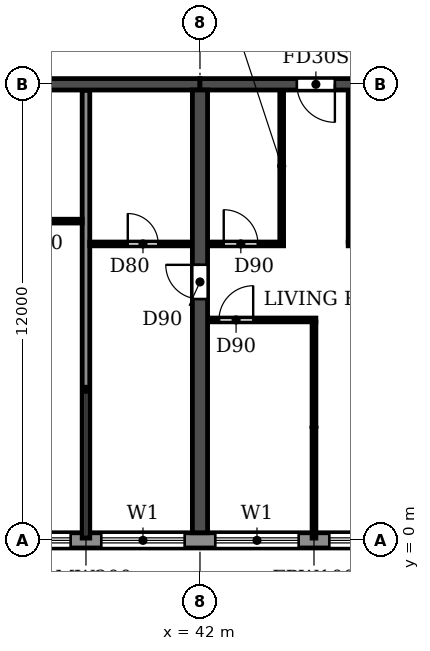
"""IFC4 building model, lengths in metres.
Left out: names, types, materials, properties, quantities, classifications, styles, units other than length and angle.
Written with IfcOpenShell. Run it as: python <this file> out.ifc"""

import sys

from ifc_helpers import new_model, si_unit, direction, frame, frame_2d, origin, place, context, subcontext, project, spatial, rectangle, extrude, element, fill, save


model = new_model("IFC4")
c1 = context("Model", 3, precision=1e-05, world=origin(), true_north=direction((0.0, 1.0)))
c2 = subcontext(c1, "Body", "Model", "MODEL_VIEW")
j1 = project(units=[si_unit("LENGTHUNIT", "METRE"), si_unit("PLANEANGLEUNIT", "RADIAN")], contexts=[c1])
p1 = place(None, origin())
s1 = spatial("IfcSite", under=j1, at=p1, CompositionType="ELEMENT")
p2 = place(p1, origin())
s2 = spatial("IfcBuilding", under=s1, at=p2, CompositionType="ELEMENT")
p3 = place(p2, frame((0.0, 0.0, 33.3)))
s3 = spatial("IfcBuildingStorey", under=s2, at=p3, CompositionType="ELEMENT", Elevation=33.3)
p4 = place(p3, frame((42.0, 0.2, 0.0), z_axis=(0.0, 0.0, 1.0), x_axis=(0.0, 1.0, 0.0)))
e1 = element("IfcWall", 1, at=p4, inside=s3, PredefinedType="SHEAR", context=c2, shape_type="SweptSolid", body=[
    extrude(rectangle(XDim=11.65, YDim=0.4, at=frame_2d((5.825, 0.0))), origin(), (0.0, 0.0, 1.0), 3.05),
])
p5 = place(p4, frame((6.15, 0.0, 0.0)))
e2 = element("IfcOpeningElement", 2, at=p5, cuts=e1, PredefinedType="OPENING", context=c2, shape_type="SweptSolid", body=[
    extrude(rectangle(XDim=0.9, YDim=2.1, at=frame_2d((0.45, 1.05))), frame((0.0, 0.21, 0.0), z_axis=(0.0, -1.0, 0.0), x_axis=(1.0, 0.0, 0.0)), (0.0, 0.0, 1.0), 0.42),
])
p6 = place(p3, frame((36.0, 12.0, 0.0), z_axis=(0.0, 0.0, 1.0), x_axis=(1.0, 0.0, 0.0)))
e3 = element("IfcWall", 3, at=p6, inside=s3, PredefinedType="SHEAR", context=c2, shape_type="SweptSolid", body=[
    extrude(rectangle(XDim=6.0, YDim=0.3, at=frame_2d((3.0, 0.0))), origin(), (0.0, 0.0, 1.0), 2.45),
])
p7 = place(p3, frame((42.0, 12.0, 0.0), z_axis=(0.0, 0.0, 1.0), x_axis=(1.0, 0.0, 0.0)))
e4 = element("IfcWall", 4, at=p7, inside=s3, PredefinedType="SHEAR", context=c2, shape_type="SweptSolid", body=[
    extrude(rectangle(XDim=6.0, YDim=0.3, at=frame_2d((3.0, 0.0))), origin(), (0.0, 0.0, 1.0), 2.45),
])
p8 = place(p7, frame((2.55, 0.0, 0.0)))
e5 = element("IfcOpeningElement", 5, at=p8, cuts=e4, PredefinedType="OPENING", context=c2, shape_type="SweptSolid", body=[
    extrude(rectangle(XDim=1.0, YDim=2.1, at=frame_2d((0.5, 1.05))), frame((0.0, 0.16, 0.0), z_axis=(0.0, -1.0, 0.0), x_axis=(1.0, 0.0, 0.0)), (0.0, 0.0, 1.0), 0.32),
])
p9 = place(p3, frame((4.683, 0.0, 0.0), z_axis=(0.0, 0.0, 1.0), x_axis=(1.0, 0.0, 0.0)))
e6 = element("IfcWall", 6, at=p9, inside=s3, PredefinedType="STANDARD", context=c2, shape_type="SweptSolid", body=[
    extrude(rectangle(XDim=92.634, YDim=0.4, at=frame_2d((46.317, 0.0))), origin(), (0.0, 0.0, 1.0), 3.05),
])
p10 = place(p9, frame((1.717, 0.0, 0.9)))
e7 = element("IfcOpeningElement", 7, at=p10, cuts=e6, PredefinedType="OPENING", context=c2, shape_type="SweptSolid", body=[
    extrude(rectangle(XDim=2.2, YDim=1.5, at=frame_2d((1.1, 0.75))), frame((0.0, 0.21, 0.0), z_axis=(0.0, -1.0, 0.0), x_axis=(1.0, 0.0, 0.0)), (0.0, 0.0, 1.0), 0.42),
])
p11 = place(p9, frame((4.717, 0.0, 0.9)))
e8 = element("IfcOpeningElement", 8, at=p11, cuts=e6, PredefinedType="OPENING", context=c2, shape_type="SweptSolid", body=[
    extrude(rectangle(XDim=2.2, YDim=1.5, at=frame_2d((1.1, 0.75))), frame((0.0, 0.21, 0.0), z_axis=(0.0, -1.0, 0.0), x_axis=(1.0, 0.0, 0.0)), (0.0, 0.0, 1.0), 0.42),
])
p12 = place(p9, frame((7.917, 0.0, 0.0)))
e9 = element("IfcOpeningElement", 9, at=p12, cuts=e6, PredefinedType="OPENING", context=c2, shape_type="SweptSolid", body=[
    extrude(rectangle(XDim=1.8, YDim=2.4, at=frame_2d((0.9, 1.2))), frame((0.0, 0.21, 0.0), z_axis=(0.0, -1.0, 0.0), x_axis=(1.0, 0.0, 0.0)), (0.0, 0.0, 1.0), 0.42),
])
p13 = place(p9, frame((10.717, 0.0, 0.9)))
e10 = element("IfcOpeningElement", 10, at=p13, cuts=e6, PredefinedType="OPENING", context=c2, shape_type="SweptSolid", body=[
    extrude(rectangle(XDim=2.2, YDim=1.5, at=frame_2d((1.1, 0.75))), frame((0.0, 0.21, 0.0), z_axis=(0.0, -1.0, 0.0), x_axis=(1.0, 0.0, 0.0)), (0.0, 0.0, 1.0), 0.42),
])
p14 = place(p9, frame((13.717, 0.0, 0.9)))
e11 = element("IfcOpeningElement", 11, at=p14, cuts=e6, PredefinedType="OPENING", context=c2, shape_type="SweptSolid", body=[
    extrude(rectangle(XDim=2.2, YDim=1.5, at=frame_2d((1.1, 0.75))), frame((0.0, 0.21, 0.0), z_axis=(0.0, -1.0, 0.0), x_axis=(1.0, 0.0, 0.0)), (0.0, 0.0, 1.0), 0.42),
])
p15 = place(p9, frame((16.717, 0.0, 0.9)))
e12 = element("IfcOpeningElement", 12, at=p15, cuts=e6, PredefinedType="OPENING", context=c2, shape_type="SweptSolid", body=[
    extrude(rectangle(XDim=2.2, YDim=1.5, at=frame_2d((1.1, 0.75))), frame((0.0, 0.21, 0.0), z_axis=(0.0, -1.0, 0.0), x_axis=(1.0, 0.0, 0.0)), (0.0, 0.0, 1.0), 0.42),
])
p16 = place(p9, frame((19.717, 0.0, 0.9)))
e13 = element("IfcOpeningElement", 13, at=p16, cuts=e6, PredefinedType="OPENING", context=c2, shape_type="SweptSolid", body=[
    extrude(rectangle(XDim=2.2, YDim=1.5, at=frame_2d((1.1, 0.75))), frame((0.0, 0.21, 0.0), z_axis=(0.0, -1.0, 0.0), x_axis=(1.0, 0.0, 0.0)), (0.0, 0.0, 1.0), 0.42),
])
p17 = place(p9, frame((22.917, 0.0, 0.0)))
e14 = element("IfcOpeningElement", 14, at=p17, cuts=e6, PredefinedType="OPENING", context=c2, shape_type="SweptSolid", body=[
    extrude(rectangle(XDim=1.8, YDim=2.4, at=frame_2d((0.9, 1.2))), frame((0.0, 0.21, 0.0), z_axis=(0.0, -1.0, 0.0), x_axis=(1.0, 0.0, 0.0)), (0.0, 0.0, 1.0), 0.42),
])
p18 = place(p9, frame((25.717, 0.0, 0.9)))
e15 = element("IfcOpeningElement", 15, at=p18, cuts=e6, PredefinedType="OPENING", context=c2, shape_type="SweptSolid", body=[
    extrude(rectangle(XDim=2.2, YDim=1.5, at=frame_2d((1.1, 0.75))), frame((0.0, 0.21, 0.0), z_axis=(0.0, -1.0, 0.0), x_axis=(1.0, 0.0, 0.0)), (0.0, 0.0, 1.0), 0.42),
])
p19 = place(p9, frame((28.717, 0.0, 0.9)))
e16 = element("IfcOpeningElement", 16, at=p19, cuts=e6, PredefinedType="OPENING", context=c2, shape_type="SweptSolid", body=[
    extrude(rectangle(XDim=2.2, YDim=1.5, at=frame_2d((1.1, 0.75))), frame((0.0, 0.21, 0.0), z_axis=(0.0, -1.0, 0.0), x_axis=(1.0, 0.0, 0.0)), (0.0, 0.0, 1.0), 0.42),
])
p20 = place(p9, frame((31.717, 0.0, 0.9)))
e17 = element("IfcOpeningElement", 17, at=p20, cuts=e6, PredefinedType="OPENING", context=c2, shape_type="SweptSolid", body=[
    extrude(rectangle(XDim=2.2, YDim=1.5, at=frame_2d((1.1, 0.75))), frame((0.0, 0.21, 0.0), z_axis=(0.0, -1.0, 0.0), x_axis=(1.0, 0.0, 0.0)), (0.0, 0.0, 1.0), 0.42),
])
p21 = place(p9, frame((34.717, 0.0, 0.9)))
e18 = element("IfcOpeningElement", 18, at=p21, cuts=e6, PredefinedType="OPENING", context=c2, shape_type="SweptSolid", body=[
    extrude(rectangle(XDim=2.2, YDim=1.5, at=frame_2d((1.1, 0.75))), frame((0.0, 0.21, 0.0), z_axis=(0.0, -1.0, 0.0), x_axis=(1.0, 0.0, 0.0)), (0.0, 0.0, 1.0), 0.42),
])
p22 = place(p9, frame((37.717, 0.0, 0.9)))
e19 = element("IfcOpeningElement", 19, at=p22, cuts=e6, PredefinedType="OPENING", context=c2, shape_type="SweptSolid", body=[
    extrude(rectangle(XDim=2.2, YDim=1.5, at=frame_2d((1.1, 0.75))), frame((0.0, 0.21, 0.0), z_axis=(0.0, -1.0, 0.0), x_axis=(1.0, 0.0, 0.0)), (0.0, 0.0, 1.0), 0.42),
])
p23 = place(p9, frame((40.717, 0.0, 0.9)))
e20 = element("IfcOpeningElement", 20, at=p23, cuts=e6, PredefinedType="OPENING", context=c2, shape_type="SweptSolid", body=[
    extrude(rectangle(XDim=2.2, YDim=1.5, at=frame_2d((1.1, 0.75))), frame((0.0, 0.21, 0.0), z_axis=(0.0, -1.0, 0.0), x_axis=(1.0, 0.0, 0.0)), (0.0, 0.0, 1.0), 0.42),
])
p24 = place(p9, frame((43.717, 0.0, 0.9)))
e21 = element("IfcOpeningElement", 21, at=p24, cuts=e6, PredefinedType="OPENING", context=c2, shape_type="SweptSolid", body=[
    extrude(rectangle(XDim=2.2, YDim=1.5, at=frame_2d((1.1, 0.75))), frame((0.0, 0.21, 0.0), z_axis=(0.0, -1.0, 0.0), x_axis=(1.0, 0.0, 0.0)), (0.0, 0.0, 1.0), 0.42),
])
p25 = place(p9, frame((46.917, 0.0, 0.0)))
e22 = element("IfcOpeningElement", 22, at=p25, cuts=e6, PredefinedType="OPENING", context=c2, shape_type="SweptSolid", body=[
    extrude(rectangle(XDim=1.8, YDim=2.4, at=frame_2d((0.9, 1.2))), frame((0.0, 0.21, 0.0), z_axis=(0.0, -1.0, 0.0), x_axis=(1.0, 0.0, 0.0)), (0.0, 0.0, 1.0), 0.42),
])
p26 = place(p9, frame((49.717, 0.0, 0.9)))
e23 = element("IfcOpeningElement", 23, at=p26, cuts=e6, PredefinedType="OPENING", context=c2, shape_type="SweptSolid", body=[
    extrude(rectangle(XDim=2.2, YDim=1.5, at=frame_2d((1.1, 0.75))), frame((0.0, 0.21, 0.0), z_axis=(0.0, -1.0, 0.0), x_axis=(1.0, 0.0, 0.0)), (0.0, 0.0, 1.0), 0.42),
])
p27 = place(p9, frame((52.717, 0.0, 0.9)))
e24 = element("IfcOpeningElement", 24, at=p27, cuts=e6, PredefinedType="OPENING", context=c2, shape_type="SweptSolid", body=[
    extrude(rectangle(XDim=2.2, YDim=1.5, at=frame_2d((1.1, 0.75))), frame((0.0, 0.21, 0.0), z_axis=(0.0, -1.0, 0.0), x_axis=(1.0, 0.0, 0.0)), (0.0, 0.0, 1.0), 0.42),
])
p28 = place(p9, frame((55.717, 0.0, 0.9)))
e25 = element("IfcOpeningElement", 25, at=p28, cuts=e6, PredefinedType="OPENING", context=c2, shape_type="SweptSolid", body=[
    extrude(rectangle(XDim=2.2, YDim=1.5, at=frame_2d((1.1, 0.75))), frame((0.0, 0.21, 0.0), z_axis=(0.0, -1.0, 0.0), x_axis=(1.0, 0.0, 0.0)), (0.0, 0.0, 1.0), 0.42),
])
p29 = place(p9, frame((58.917, 0.0, 0.0)))
e26 = element("IfcOpeningElement", 26, at=p29, cuts=e6, PredefinedType="OPENING", context=c2, shape_type="SweptSolid", body=[
    extrude(rectangle(XDim=1.8, YDim=2.4, at=frame_2d((0.9, 1.2))), frame((0.0, 0.21, 0.0), z_axis=(0.0, -1.0, 0.0), x_axis=(1.0, 0.0, 0.0)), (0.0, 0.0, 1.0), 0.42),
])
p30 = place(p9, frame((61.717, 0.0, 0.9)))
e27 = element("IfcOpeningElement", 27, at=p30, cuts=e6, PredefinedType="OPENING", context=c2, shape_type="SweptSolid", body=[
    extrude(rectangle(XDim=2.2, YDim=1.5, at=frame_2d((1.1, 0.75))), frame((0.0, 0.21, 0.0), z_axis=(0.0, -1.0, 0.0), x_axis=(1.0, 0.0, 0.0)), (0.0, 0.0, 1.0), 0.42),
])
p31 = place(p9, frame((64.717, 0.0, 0.9)))
e28 = element("IfcOpeningElement", 28, at=p31, cuts=e6, PredefinedType="OPENING", context=c2, shape_type="SweptSolid", body=[
    extrude(rectangle(XDim=2.2, YDim=1.5, at=frame_2d((1.1, 0.75))), frame((0.0, 0.21, 0.0), z_axis=(0.0, -1.0, 0.0), x_axis=(1.0, 0.0, 0.0)), (0.0, 0.0, 1.0), 0.42),
])
p32 = place(p9, frame((67.717, 0.0, 0.9)))
e29 = element("IfcOpeningElement", 29, at=p32, cuts=e6, PredefinedType="OPENING", context=c2, shape_type="SweptSolid", body=[
    extrude(rectangle(XDim=2.2, YDim=1.5, at=frame_2d((1.1, 0.75))), frame((0.0, 0.21, 0.0), z_axis=(0.0, -1.0, 0.0), x_axis=(1.0, 0.0, 0.0)), (0.0, 0.0, 1.0), 0.42),
])
p33 = place(p9, frame((70.917, 0.0, 0.0)))
e30 = element("IfcOpeningElement", 30, at=p33, cuts=e6, PredefinedType="OPENING", context=c2, shape_type="SweptSolid", body=[
    extrude(rectangle(XDim=1.8, YDim=2.4, at=frame_2d((0.9, 1.2))), frame((0.0, 0.21, 0.0), z_axis=(0.0, -1.0, 0.0), x_axis=(1.0, 0.0, 0.0)), (0.0, 0.0, 1.0), 0.42),
])
p34 = place(p9, frame((73.717, 0.0, 0.9)))
e31 = element("IfcOpeningElement", 31, at=p34, cuts=e6, PredefinedType="OPENING", context=c2, shape_type="SweptSolid", body=[
    extrude(rectangle(XDim=2.2, YDim=1.5, at=frame_2d((1.1, 0.75))), frame((0.0, 0.21, 0.0), z_axis=(0.0, -1.0, 0.0), x_axis=(1.0, 0.0, 0.0)), (0.0, 0.0, 1.0), 0.42),
])
p35 = place(p9, frame((76.717, 0.0, 0.9)))
e32 = element("IfcOpeningElement", 32, at=p35, cuts=e6, PredefinedType="OPENING", context=c2, shape_type="SweptSolid", body=[
    extrude(rectangle(XDim=2.2, YDim=1.5, at=frame_2d((1.1, 0.75))), frame((0.0, 0.21, 0.0), z_axis=(0.0, -1.0, 0.0), x_axis=(1.0, 0.0, 0.0)), (0.0, 0.0, 1.0), 0.42),
])
p36 = place(p9, frame((79.717, 0.0, 0.9)))
e33 = element("IfcOpeningElement", 33, at=p36, cuts=e6, PredefinedType="OPENING", context=c2, shape_type="SweptSolid", body=[
    extrude(rectangle(XDim=2.2, YDim=1.5, at=frame_2d((1.1, 0.75))), frame((0.0, 0.21, 0.0), z_axis=(0.0, -1.0, 0.0), x_axis=(1.0, 0.0, 0.0)), (0.0, 0.0, 1.0), 0.42),
])
p37 = place(p9, frame((82.717, 0.0, 0.9)))
e34 = element("IfcOpeningElement", 34, at=p37, cuts=e6, PredefinedType="OPENING", context=c2, shape_type="SweptSolid", body=[
    extrude(rectangle(XDim=2.2, YDim=1.5, at=frame_2d((1.1, 0.75))), frame((0.0, 0.21, 0.0), z_axis=(0.0, -1.0, 0.0), x_axis=(1.0, 0.0, 0.0)), (0.0, 0.0, 1.0), 0.42),
])
p38 = place(p9, frame((85.717, 0.0, 0.9)))
e35 = element("IfcOpeningElement", 35, at=p38, cuts=e6, PredefinedType="OPENING", context=c2, shape_type="SweptSolid", body=[
    extrude(rectangle(XDim=2.2, YDim=1.5, at=frame_2d((1.1, 0.75))), frame((0.0, 0.21, 0.0), z_axis=(0.0, -1.0, 0.0), x_axis=(1.0, 0.0, 0.0)), (0.0, 0.0, 1.0), 0.42),
])
p39 = place(p9, frame((88.717, 0.0, 0.9)))
e36 = element("IfcOpeningElement", 36, at=p39, cuts=e6, PredefinedType="OPENING", context=c2, shape_type="SweptSolid", body=[
    extrude(rectangle(XDim=2.2, YDim=1.5, at=frame_2d((1.1, 0.75))), frame((0.0, 0.21, 0.0), z_axis=(0.0, -1.0, 0.0), x_axis=(1.0, 0.0, 0.0)), (0.0, 0.0, 1.0), 0.42),
])
p40 = place(p3, frame((39.0, 0.06, 0.0), z_axis=(0.0, 0.0, 1.0), x_axis=(0.0, 1.0, 0.0)))
e37 = element("IfcWall", 37, at=p40, inside=s3, PredefinedType="PARTITIONING", context=c2, shape_type="SweptSolid", body=[
    extrude(rectangle(XDim=11.78, YDim=0.2, at=frame_2d((5.89, 0.0))), origin(), (0.0, 0.0, 1.0), 3.05),
])
p41 = place(p3, frame((42.21, 5.8, 0.0), z_axis=(0.0, 0.0, 1.0), x_axis=(1.0, 0.0, 0.0)))
e38 = element("IfcWall", 38, at=p41, inside=s3, PredefinedType="PARTITIONING", context=c2, shape_type="SweptSolid", body=[
    extrude(rectangle(XDim=2.84, YDim=0.1, at=frame_2d((1.42, 0.0))), origin(), (0.0, 0.0, 1.0), 3.05),
])
p42 = place(p41, frame((0.29, 0.0, 0.0)))
e39 = element("IfcOpeningElement", 39, at=p42, cuts=e38, PredefinedType="OPENING", context=c2, shape_type="SweptSolid", body=[
    extrude(rectangle(XDim=0.9, YDim=2.1, at=frame_2d((0.45, 1.05))), frame((0.0, 0.06, 0.0), z_axis=(0.0, -1.0, 0.0), x_axis=(1.0, 0.0, 0.0)), (0.0, 0.0, 1.0), 0.12),
])
p43 = place(p3, frame((39.1, 7.8, 0.0), z_axis=(0.0, 0.0, 1.0), x_axis=(1.0, 0.0, 0.0)))
e40 = element("IfcWall", 40, at=p43, inside=s3, PredefinedType="PARTITIONING", context=c2, shape_type="SweptSolid", body=[
    extrude(rectangle(XDim=2.69, YDim=0.1, at=frame_2d((1.345, 0.0))), origin(), (0.0, 0.0, 1.0), 3.05),
])
p44 = place(p43, frame((1.0, 0.0, 0.0)))
e41 = element("IfcOpeningElement", 41, at=p44, cuts=e40, PredefinedType="OPENING", context=c2, shape_type="SweptSolid", body=[
    extrude(rectangle(XDim=0.8, YDim=2.1, at=frame_2d((0.4, 1.05))), frame((0.0, 0.06, 0.0), z_axis=(0.0, -1.0, 0.0), x_axis=(1.0, 0.0, 0.0)), (0.0, 0.0, 1.0), 0.12),
])
p45 = place(p3, frame((42.21, 7.8, 0.0), z_axis=(0.0, 0.0, 1.0), x_axis=(1.0, 0.0, 0.0)))
e42 = element("IfcWall", 42, at=p45, inside=s3, PredefinedType="PARTITIONING", context=c2, shape_type="SweptSolid", body=[
    extrude(rectangle(XDim=1.99, YDim=0.1, at=frame_2d((0.995, 0.0))), origin(), (0.0, 0.0, 1.0), 3.05),
])
p46 = place(p45, frame((0.415, 0.0, 0.0)))
e43 = element("IfcOpeningElement", 43, at=p46, cuts=e42, PredefinedType="OPENING", context=c2, shape_type="SweptSolid", body=[
    extrude(rectangle(XDim=0.9, YDim=2.1, at=frame_2d((0.45, 1.05))), frame((0.0, 0.06, 0.0), z_axis=(0.0, -1.0, 0.0), x_axis=(1.0, 0.0, 0.0)), (0.0, 0.0, 1.0), 0.12),
])
p47 = place(p3, frame((45.9, 7.8, 0.0), z_axis=(0.0, 0.0, 1.0), x_axis=(1.0, 0.0, 0.0)))
e44 = element("IfcWall", 44, at=p47, inside=s3, PredefinedType="PARTITIONING", context=c2, shape_type="SweptSolid", body=[
    extrude(rectangle(XDim=1.89, YDim=0.1, at=frame_2d((0.945, 0.0))), origin(), (0.0, 0.0, 1.0), 3.05),
])
p48 = place(p47, frame((0.675, 0.0, 0.0)))
e45 = element("IfcOpeningElement", 45, at=p48, cuts=e44, PredefinedType="OPENING", context=c2, shape_type="SweptSolid", body=[
    extrude(rectangle(XDim=0.8, YDim=2.1, at=frame_2d((0.4, 1.05))), frame((0.0, 0.06, 0.0), z_axis=(0.0, -1.0, 0.0), x_axis=(1.0, 0.0, 0.0)), (0.0, 0.0, 1.0), 0.12),
])
p49 = place(p3, frame((36.21, 8.4, 0.0), z_axis=(0.0, 0.0, 1.0), x_axis=(1.0, 0.0, 0.0)))
e46 = element("IfcWall", 46, at=p49, inside=s3, PredefinedType="PARTITIONING", context=c2, shape_type="SweptSolid", body=[
    extrude(rectangle(XDim=2.69, YDim=0.1, at=frame_2d((1.345, 0.0))), origin(), (0.0, 0.0, 1.0), 3.05),
])
p50 = place(p49, frame((0.89, 0.0, 0.0)))
e47 = element("IfcOpeningElement", 47, at=p50, cuts=e46, PredefinedType="OPENING", context=c2, shape_type="SweptSolid", body=[
    extrude(rectangle(XDim=0.8, YDim=2.1, at=frame_2d((0.4, 1.05))), frame((0.0, 0.06, 0.0), z_axis=(0.0, -1.0, 0.0), x_axis=(1.0, 0.0, 0.0)), (0.0, 0.0, 1.0), 0.12),
])
p51 = place(p3, frame((44.15, 7.85, 0.0), z_axis=(0.0, 0.0, 1.0), x_axis=(0.0, 1.0, 0.0)))
e48 = element("IfcWall", 48, at=p51, inside=s3, PredefinedType="PARTITIONING", context=c2, shape_type="SweptSolid", body=[
    extrude(rectangle(XDim=3.99, YDim=0.1, at=frame_2d((1.995, 0.0))), origin(), (0.0, 0.0, 1.0), 3.05),
])
p52 = place(p3, frame((45.0, 0.06, 0.0), z_axis=(0.0, 0.0, 1.0), x_axis=(0.0, 1.0, 0.0)))
e49 = element("IfcWall", 49, at=p52, inside=s3, PredefinedType="PARTITIONING", context=c2, shape_type="SweptSolid", body=[
    extrude(rectangle(XDim=5.69, YDim=0.1, at=frame_2d((2.845, 0.0))), origin(), (0.0, 0.0, 1.0), 3.05),
])
p53 = place(p3, frame((45.95, 7.85, 0.0), z_axis=(0.0, 0.0, 1.0), x_axis=(0.0, 1.0, 0.0)))
e50 = element("IfcWall", 50, at=p53, inside=s3, PredefinedType="PARTITIONING", context=c2, shape_type="SweptSolid", body=[
    extrude(rectangle(XDim=3.99, YDim=0.1, at=frame_2d((1.995, 0.0))), origin(), (0.0, 0.0, 1.0), 3.05),
])
p54 = place(p20, origin())
e51 = element("IfcWindow", 51, at=p54, inside=s3, PartitioningType="DOUBLE_PANEL_HORIZONTAL", PredefinedType="WINDOW", context=c2, shape_type="SweptSolid", body=[
    extrude(rectangle(XDim=2.2, YDim=1.5, at=frame_2d((1.1, 0.75))), frame((0.0, 0.03, 0.0), z_axis=(0.0, -1.0, 0.0), x_axis=(1.0, 0.0, 0.0)), (0.0, 0.0, 1.0), 0.06),
])
fill(e17, e51)
p55 = place(p21, origin())
e52 = element("IfcWindow", 52, at=p55, inside=s3, PartitioningType="DOUBLE_PANEL_HORIZONTAL", PredefinedType="WINDOW", context=c2, shape_type="SweptSolid", body=[
    extrude(rectangle(XDim=2.2, YDim=1.5, at=frame_2d((1.1, 0.75))), frame((0.0, 0.03, 0.0), z_axis=(0.0, -1.0, 0.0), x_axis=(1.0, 0.0, 0.0)), (0.0, 0.0, 1.0), 0.06),
])
fill(e18, e52)
p56 = place(p22, origin())
e53 = element("IfcWindow", 53, at=p56, inside=s3, PartitioningType="DOUBLE_PANEL_HORIZONTAL", PredefinedType="WINDOW", context=c2, shape_type="SweptSolid", body=[
    extrude(rectangle(XDim=2.2, YDim=1.5, at=frame_2d((1.1, 0.75))), frame((0.0, 0.03, 0.0), z_axis=(0.0, -1.0, 0.0), x_axis=(1.0, 0.0, 0.0)), (0.0, 0.0, 1.0), 0.06),
])
fill(e19, e53)
p57 = place(p23, origin())
e54 = element("IfcWindow", 54, at=p57, inside=s3, PartitioningType="DOUBLE_PANEL_HORIZONTAL", PredefinedType="WINDOW", context=c2, shape_type="SweptSolid", body=[
    extrude(rectangle(XDim=2.2, YDim=1.5, at=frame_2d((1.1, 0.75))), frame((0.0, 0.03, 0.0), z_axis=(0.0, -1.0, 0.0), x_axis=(1.0, 0.0, 0.0)), (0.0, 0.0, 1.0), 0.06),
])
fill(e20, e54)
p58 = place(p44, origin())
e55 = element("IfcDoor", 55, at=p58, inside=s3, OperationType="SINGLE_SWING_LEFT", PredefinedType="DOOR", context=c2, shape_type="SweptSolid", body=[
    extrude(rectangle(XDim=0.8, YDim=2.1, at=frame_2d((0.4, 1.05))), frame((0.0, 0.025, 0.0), z_axis=(0.0, -1.0, 0.0), x_axis=(1.0, 0.0, 0.0)), (0.0, 0.0, 1.0), 0.05),
])
fill(e41, e55)
p59 = place(p5, origin())
e56 = element("IfcDoor", 56, at=p59, inside=s3, OperationType="SINGLE_SWING_RIGHT", PredefinedType="DOOR", context=c2, shape_type="SweptSolid", body=[
    extrude(rectangle(XDim=0.9, YDim=2.1, at=frame_2d((0.45, 1.05))), frame((0.0, 0.025, 0.0), z_axis=(0.0, -1.0, 0.0), x_axis=(1.0, 0.0, 0.0)), (0.0, 0.0, 1.0), 0.05),
])
fill(e2, e56)
p60 = place(p42, origin())
e57 = element("IfcDoor", 57, at=p60, inside=s3, OperationType="SINGLE_SWING_RIGHT", PredefinedType="DOOR", context=c2, shape_type="SweptSolid", body=[
    extrude(rectangle(XDim=0.9, YDim=2.1, at=frame_2d((0.45, 1.05))), frame((0.0, 0.025, 0.0), z_axis=(0.0, -1.0, 0.0), x_axis=(1.0, 0.0, 0.0)), (0.0, 0.0, 1.0), 0.05),
])
fill(e39, e57)
p61 = place(p46, origin())
e58 = element("IfcDoor", 58, at=p61, inside=s3, OperationType="SINGLE_SWING_LEFT", PredefinedType="DOOR", context=c2, shape_type="SweptSolid", body=[
    extrude(rectangle(XDim=0.9, YDim=2.1, at=frame_2d((0.45, 1.05))), frame((0.0, 0.025, 0.0), z_axis=(0.0, -1.0, 0.0), x_axis=(1.0, 0.0, 0.0)), (0.0, 0.0, 1.0), 0.05),
])
fill(e43, e58)
p62 = place(p8, frame((1.0, 0.0, 0.0), z_axis=(0.0, 0.0, 1.0), x_axis=(-1.0, 0.0, 0.0)))
e59 = element("IfcDoor", 59, at=p62, inside=s3, OperationType="SINGLE_SWING_LEFT", PredefinedType="DOOR", context=c2, shape_type="SweptSolid", body=[
    extrude(rectangle(XDim=1.0, YDim=2.1, at=frame_2d((0.5, 1.05))), frame((0.0, 0.025, 0.0), z_axis=(0.0, -1.0, 0.0), x_axis=(1.0, 0.0, 0.0)), (0.0, 0.0, 1.0), 0.05),
])
fill(e5, e59)
save(model, sys.argv[1])
